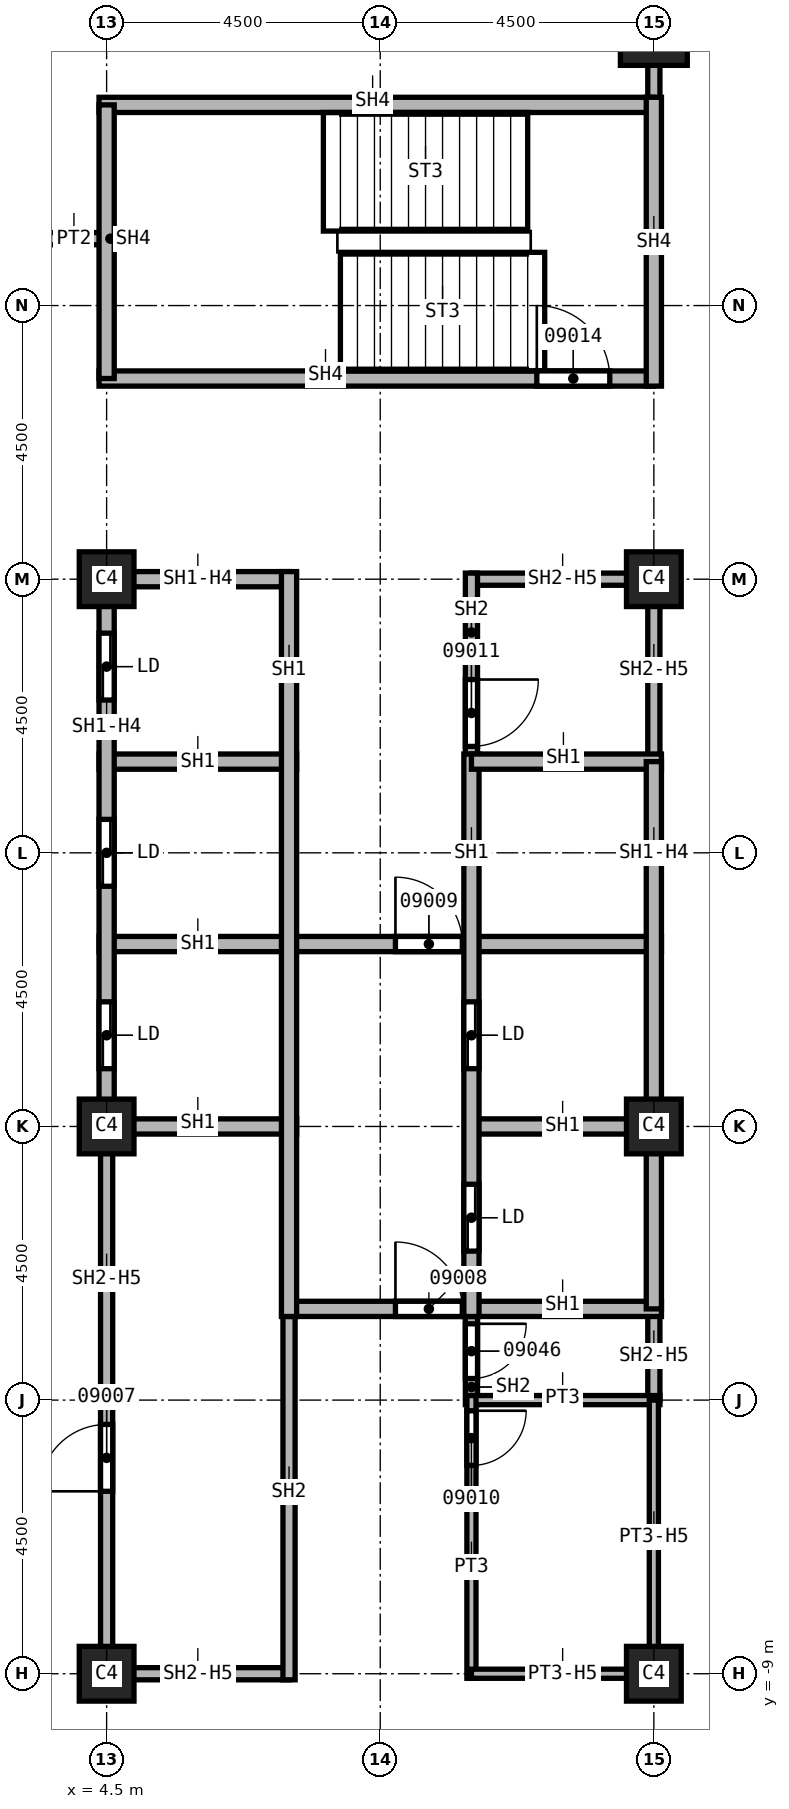
"""IFC4 building model, lengths in metres.
Left out: names, types, materials, properties, quantities, classifications, styles, units other than length and angle.
Written with IfcOpenShell. Run it as: python <this file> out.ifc"""

import sys

from ifc_helpers import new_model, si_unit, direction, frame, frame_2d, origin, origin_2d, place, context, subcontext, project, spatial, rectangle, extrude, element, fill, save


model = new_model("IFC4")
c1 = context("Model", 3, precision=1e-05, world=origin(), true_north=direction((0.0, 1.0)))
c2 = subcontext(c1, "Body", "Model", "MODEL_VIEW")
j1 = project(units=[si_unit("LENGTHUNIT", "METRE"), si_unit("PLANEANGLEUNIT", "RADIAN")], contexts=[c1])
p1 = place(None, origin())
s1 = spatial("IfcSite", under=j1, at=p1, CompositionType="ELEMENT")
p2 = place(p1, origin())
s2 = spatial("IfcBuilding", under=s1, at=p2, CompositionType="ELEMENT")
p3 = place(p2, frame((0.0, 0.0, 162.0)))
s3 = spatial("IfcBuildingStorey", under=s2, at=p3, CompositionType="ELEMENT", Elevation=162.0)
p4 = place(p3, frame((13.5, 18.0, 0.0), z_axis=(0.0, 0.0, 1.0), x_axis=(1.0, 0.0, 0.0)))
e1 = element("IfcColumn", 1, at=p4, inside=s3, PredefinedType="COLUMN", context=c2, shape_type="SweptSolid", body=[
    extrude(rectangle(XDim=1.1, YDim=1.1, at=origin_2d()), origin(), (0.0, 0.0, 1.0), 3.7),
])
for number, where, z_axis, x_axis in (
    (2, (4.5, 0.0, 0.0), (0.0, 0.0, 1.0), (1.0, 0.0, 0.0)),
    (3, (4.5, 9.0, 0.0), (0.0, 0.0, 1.0), (1.0, 0.0, 0.0)),
    (4, (4.5, -9.0, 0.0), (0.0, 0.0, 1.0), (1.0, 0.0, 0.0)),
    (5, (13.5, 0.0, 0.0), (0.0, 0.0, 1.0), (1.0, 0.0, 0.0)),
    (6, (13.5, 9.0, 0.0), (0.0, 0.0, 1.0), (1.0, 0.0, 0.0)),
    (7, (13.5, -9.0, 0.0), (0.0, 0.0, 1.0), (1.0, 0.0, 0.0)),
):
    element("IfcColumn", number, at=place(p3, frame(where, z_axis=z_axis, x_axis=x_axis)), inside=s3, PredefinedType="COLUMN", context=c2, shape_type="SweptSolid", body=[
        extrude(rectangle(XDim=0.9, YDim=0.9, at=origin_2d()), origin(), (0.0, 0.0, 1.0), 3.7),
    ])
p5 = place(p3, frame((3.55, 14.6, 0.0), z_axis=(0.0, 0.0, 1.0), x_axis=(1.0, 0.0, 0.0)))
e8 = element("IfcWall", 8, at=p5, inside=s3, PredefinedType="PARTITIONING", context=c2, shape_type="SweptSolid", body=[
    extrude(rectangle(XDim=0.95, YDim=0.2, at=frame_2d((0.475, 0.0))), origin(), (0.0, 0.0, 1.0), 3.7),
])
p6 = place(p3, frame((13.5, 16.675, 0.0), z_axis=(0.0, 0.0, 1.0), x_axis=(0.0, 1.0, 0.0)))
e9 = element("IfcWall", 9, at=p6, inside=s3, PredefinedType="PARTITIONING", context=c2, shape_type="SweptSolid", body=[
    extrude(rectangle(XDim=6.375, YDim=0.2, at=frame_2d((3.188, 0.0))), origin(), (0.0, 0.0, 1.0), 3.7),
])
p7 = place(p6, frame((4.45, 0.0, 0.0)))
e10 = element("IfcOpeningElement", 10, at=p7, cuts=e9, PredefinedType="OPENING", context=c2, shape_type="SweptSolid", body=[
    extrude(rectangle(XDim=1.0, YDim=2.1, at=frame_2d((0.5, 1.05))), frame((0.0, 0.1, 0.0), z_axis=(0.0, -1.0, 0.0), x_axis=(1.0, 0.0, 0.0)), (0.0, 0.0, 1.0), 0.2),
])
p8 = place(p3, frame((4.5, -9.1, 0.0), z_axis=(0.0, 0.0, 1.0), x_axis=(0.0, 1.0, 0.0)))
e11 = element("IfcWall", 11, at=p8, inside=s3, PredefinedType="SOLIDWALL", context=c2, shape_type="SweptSolid", body=[
    extrude(rectangle(XDim=9.1, YDim=0.2, at=frame_2d((4.55, 0.0))), origin(), (0.0, 0.0, 1.0), 2.938),
])
p9 = place(p8, frame((3.1, 0.0, 0.0)))
e12 = element("IfcOpeningElement", 12, at=p9, cuts=e11, PredefinedType="OPENING", context=c2, shape_type="SweptSolid", body=[
    extrude(rectangle(XDim=1.1, YDim=2.1, at=frame_2d((0.55, 1.05))), frame((0.0, 0.1, 0.0), z_axis=(0.0, -1.0, 0.0), x_axis=(1.0, 0.0, 0.0)), (0.0, 0.0, 1.0), 0.2),
])
p10 = place(p3, frame((7.5, -9.0, 0.0), z_axis=(0.0, 0.0, 1.0), x_axis=(-1.0, 0.0, 0.0)))
e13 = element("IfcWall", 13, at=p10, inside=s3, PredefinedType="SOLIDWALL", context=c2, shape_type="SweptSolid", body=[
    extrude(rectangle(XDim=3.0, YDim=0.2, at=frame_2d((1.5, 0.0))), origin(), (0.0, 0.0, 1.0), 2.938),
])
p11 = place(p3, frame((7.5, -2.875, 0.0), z_axis=(0.0, 0.0, 1.0), x_axis=(0.0, -1.0, 0.0)))
e14 = element("IfcWall", 14, at=p11, inside=s3, PredefinedType="SOLIDWALL", context=c2, shape_type="SweptSolid", body=[
    extrude(rectangle(XDim=6.225, YDim=0.2, at=frame_2d((3.113, 0.0))), origin(), (0.0, 0.0, 1.0), 3.7),
])
p12 = place(p3, frame((10.5, -2.875, 0.0), z_axis=(0.0, 0.0, 1.0), x_axis=(0.0, -1.0, 0.0)))
e15 = element("IfcWall", 15, at=p12, inside=s3, PredefinedType="SOLIDWALL", context=c2, shape_type="SweptSolid", body=[
    extrude(rectangle(XDim=1.7, YDim=0.2, at=frame_2d((0.85, 0.0))), origin(), (0.0, 0.0, 1.0), 3.7),
])
p13 = place(p12, frame((0.37, 0.0, 0.0)))
e16 = element("IfcOpeningElement", 16, at=p13, cuts=e15, PredefinedType="OPENING", context=c2, shape_type="SweptSolid", body=[
    extrude(rectangle(XDim=0.9, YDim=2.1, at=frame_2d((0.45, 1.05))), frame((0.0, 0.1, 0.0), z_axis=(0.0, -1.0, 0.0), x_axis=(1.0, 0.0, 0.0)), (0.0, 0.0, 1.0), 0.2),
])
p14 = place(p3, frame((10.5, 9.0, 0.0), z_axis=(0.0, 0.0, 1.0), x_axis=(1.0, 0.0, 0.0)))
e17 = element("IfcWall", 17, at=p14, inside=s3, PredefinedType="SOLIDWALL", context=c2, shape_type="SweptSolid", body=[
    extrude(rectangle(XDim=3.0, YDim=0.2, at=frame_2d((1.5, 0.0))), origin(), (0.0, 0.0, 1.0), 2.938),
])
p15 = place(p3, frame((10.5, 9.1, 0.0), z_axis=(0.0, 0.0, 1.0), x_axis=(0.0, -1.0, 0.0)))
e18 = element("IfcWall", 18, at=p15, inside=s3, PredefinedType="SOLIDWALL", context=c2, shape_type="SweptSolid", body=[
    extrude(rectangle(XDim=3.225, YDim=0.2, at=frame_2d((1.613, 0.0))), origin(), (0.0, 0.0, 1.0), 3.7),
])
p16 = place(p15, frame((1.75, 0.0, 0.0)))
e19 = element("IfcOpeningElement", 19, at=p16, cuts=e18, PredefinedType="OPENING", context=c2, shape_type="SweptSolid", body=[
    extrude(rectangle(XDim=1.1, YDim=2.1, at=frame_2d((0.55, 1.05))), frame((0.0, 0.1, 0.0), z_axis=(0.0, -1.0, 0.0), x_axis=(1.0, 0.0, 0.0)), (0.0, 0.0, 1.0), 0.2),
])
p17 = place(p3, frame((13.5, -3.0, 0.0), z_axis=(0.0, 0.0, 1.0), x_axis=(0.0, -1.0, 0.0)))
e20 = element("IfcWall", 20, at=p17, inside=s3, PredefinedType="SOLIDWALL", context=c2, shape_type="SweptSolid", body=[
    extrude(rectangle(XDim=1.5, YDim=0.2, at=frame_2d((0.75, 0.0))), origin(), (0.0, 0.0, 1.0), 2.938),
])
p18 = place(p3, frame((13.5, 9.1, 0.0), z_axis=(0.0, 0.0, 1.0), x_axis=(0.0, -1.0, 0.0)))
e21 = element("IfcWall", 21, at=p18, inside=s3, PredefinedType="SOLIDWALL", context=c2, shape_type="SweptSolid", body=[
    extrude(rectangle(XDim=3.1, YDim=0.2, at=frame_2d((1.55, 0.0))), origin(), (0.0, 0.0, 1.0), 2.938),
])
p19 = place(p3, frame((4.375, 0.0, 0.0), z_axis=(0.0, 0.0, 1.0), x_axis=(1.0, 0.0, 0.0)))
e22 = element("IfcWall", 22, at=p19, inside=s3, PredefinedType="SOLIDWALL", context=c2, shape_type="SweptSolid", body=[
    extrude(rectangle(XDim=3.25, YDim=0.25, at=frame_2d((1.625, 0.0))), origin(), (0.0, 0.0, 1.0), 3.7),
])
p20 = place(p3, frame((4.375, 3.0, 0.0), z_axis=(0.0, 0.0, 1.0), x_axis=(1.0, 0.0, 0.0)))
e23 = element("IfcWall", 23, at=p20, inside=s3, PredefinedType="SOLIDWALL", context=c2, shape_type="SweptSolid", body=[
    extrude(rectangle(XDim=9.25, YDim=0.25, at=frame_2d((4.625, 0.0))), origin(), (0.0, 0.0, 1.0), 3.7),
])
p21 = place(p20, frame((4.875, 0.0, 0.0)))
e24 = element("IfcOpeningElement", 24, at=p21, cuts=e23, PredefinedType="OPENING", context=c2, shape_type="SweptSolid", body=[
    extrude(rectangle(XDim=1.1, YDim=2.1, at=frame_2d((0.55, 1.05))), frame((0.0, 0.125, 0.0), z_axis=(0.0, -1.0, 0.0), x_axis=(1.0, 0.0, 0.0)), (0.0, 0.0, 1.0), 0.25),
])
p22 = place(p3, frame((4.375, 6.0, 0.0), z_axis=(0.0, 0.0, 1.0), x_axis=(1.0, 0.0, 0.0)))
e25 = element("IfcWall", 25, at=p22, inside=s3, PredefinedType="SOLIDWALL", context=c2, shape_type="SweptSolid", body=[
    extrude(rectangle(XDim=3.25, YDim=0.25, at=frame_2d((1.625, 0.0))), origin(), (0.0, 0.0, 1.0), 3.7),
])
p23 = place(p3, frame((4.5, 0.0, 0.0), z_axis=(0.0, 0.0, 1.0), x_axis=(0.0, 1.0, 0.0)))
e26 = element("IfcWall", 26, at=p23, inside=s3, PredefinedType="SOLIDWALL", context=c2, shape_type="SweptSolid", body=[
    extrude(rectangle(XDim=9.125, YDim=0.25, at=frame_2d((4.562, 0.0))), origin(), (0.0, 0.0, 1.0), 2.938),
])
p24 = place(p23, frame((0.95, 0.0, 0.0)))
e27 = element("IfcOpeningElement", 27, at=p24, cuts=e26, PredefinedType="OPENING", context=c2, shape_type="SweptSolid", body=[
    extrude(rectangle(XDim=1.1, YDim=2.1, at=frame_2d((0.55, 1.05))), frame((0.0, 0.125, 0.0), z_axis=(0.0, -1.0, 0.0), x_axis=(1.0, 0.0, 0.0)), (0.0, 0.0, 1.0), 0.25),
])
p25 = place(p23, frame((3.95, 0.0, 0.0)))
e28 = element("IfcOpeningElement", 28, at=p25, cuts=e26, PredefinedType="OPENING", context=c2, shape_type="SweptSolid", body=[
    extrude(rectangle(XDim=1.1, YDim=2.1, at=frame_2d((0.55, 1.05))), frame((0.0, 0.125, 0.0), z_axis=(0.0, -1.0, 0.0), x_axis=(1.0, 0.0, 0.0)), (0.0, 0.0, 1.0), 0.25),
])
p26 = place(p23, frame((7.012, 0.0, 0.0)))
e29 = element("IfcOpeningElement", 29, at=p26, cuts=e26, PredefinedType="OPENING", context=c2, shape_type="SweptSolid", body=[
    extrude(rectangle(XDim=1.1, YDim=2.1, at=frame_2d((0.55, 1.05))), frame((0.0, 0.125, 0.0), z_axis=(0.0, -1.0, 0.0), x_axis=(1.0, 0.0, 0.0)), (0.0, 0.0, 1.0), 0.25),
])
p27 = place(p3, frame((4.5, 9.0, 0.0), z_axis=(0.0, 0.0, 1.0), x_axis=(1.0, 0.0, 0.0)))
e30 = element("IfcWall", 30, at=p27, inside=s3, PredefinedType="SOLIDWALL", context=c2, shape_type="SweptSolid", body=[
    extrude(rectangle(XDim=3.0, YDim=0.25, at=frame_2d((1.5, 0.0))), origin(), (0.0, 0.0, 1.0), 2.938),
])
p28 = place(p3, frame((7.5, -3.0, 0.0), z_axis=(0.0, 0.0, 1.0), x_axis=(1.0, 0.0, 0.0)))
e31 = element("IfcWall", 31, at=p28, inside=s3, PredefinedType="SOLIDWALL", context=c2, shape_type="SweptSolid", body=[
    extrude(rectangle(XDim=6.125, YDim=0.25, at=frame_2d((3.062, 0.0))), origin(), (0.0, 0.0, 1.0), 3.7),
])
p29 = place(p28, frame((1.75, 0.0, 0.0)))
e32 = element("IfcOpeningElement", 32, at=p29, cuts=e31, PredefinedType="OPENING", context=c2, shape_type="SweptSolid", body=[
    extrude(rectangle(XDim=1.1, YDim=2.1, at=frame_2d((0.55, 1.05))), frame((0.0, 0.125, 0.0), z_axis=(0.0, -1.0, 0.0), x_axis=(1.0, 0.0, 0.0)), (0.0, 0.0, 1.0), 0.25),
])
p30 = place(p3, frame((7.5, 9.125, 0.0), z_axis=(0.0, 0.0, 1.0), x_axis=(0.0, -1.0, 0.0)))
e33 = element("IfcWall", 33, at=p30, inside=s3, PredefinedType="SOLIDWALL", context=c2, shape_type="SweptSolid", body=[
    extrude(rectangle(XDim=12.25, YDim=0.25, at=frame_2d((6.125, 0.0))), origin(), (0.0, 0.0, 1.0), 3.7),
])
p31 = place(p3, frame((10.5, 0.0, 0.0), z_axis=(0.0, 0.0, 1.0), x_axis=(1.0, 0.0, 0.0)))
e34 = element("IfcWall", 34, at=p31, inside=s3, PredefinedType="SOLIDWALL", context=c2, shape_type="SweptSolid", body=[
    extrude(rectangle(XDim=3.125, YDim=0.25, at=frame_2d((1.562, 0.0))), origin(), (0.0, 0.0, 1.0), 3.7),
])
p32 = place(p3, frame((10.5, 6.125, 0.0), z_axis=(0.0, 0.0, 1.0), x_axis=(0.0, -1.0, 0.0)))
e35 = element("IfcWall", 35, at=p32, inside=s3, PredefinedType="SOLIDWALL", context=c2, shape_type="SweptSolid", body=[
    extrude(rectangle(XDim=9.25, YDim=0.25, at=frame_2d((4.625, 0.0))), origin(), (0.0, 0.0, 1.0), 3.7),
])
p33 = place(p32, frame((7.075, 0.0, 0.0)))
e36 = element("IfcOpeningElement", 36, at=p33, cuts=e35, PredefinedType="OPENING", context=c2, shape_type="SweptSolid", body=[
    extrude(rectangle(XDim=1.1, YDim=2.1, at=frame_2d((0.55, 1.05))), frame((0.0, 0.125, 0.0), z_axis=(0.0, -1.0, 0.0), x_axis=(1.0, 0.0, 0.0)), (0.0, 0.0, 1.0), 0.25),
])
p34 = place(p32, frame((4.075, 0.0, 0.0)))
e37 = element("IfcOpeningElement", 37, at=p34, cuts=e35, PredefinedType="OPENING", context=c2, shape_type="SweptSolid", body=[
    extrude(rectangle(XDim=1.1, YDim=2.1, at=frame_2d((0.55, 1.05))), frame((0.0, 0.125, 0.0), z_axis=(0.0, -1.0, 0.0), x_axis=(1.0, 0.0, 0.0)), (0.0, 0.0, 1.0), 0.25),
])
p35 = place(p3, frame((10.5, 6.0, 0.0), z_axis=(0.0, 0.0, 1.0), x_axis=(1.0, 0.0, 0.0)))
e38 = element("IfcWall", 38, at=p35, inside=s3, PredefinedType="SOLIDWALL", context=c2, shape_type="SweptSolid", body=[
    extrude(rectangle(XDim=3.125, YDim=0.25, at=frame_2d((1.562, 0.0))), origin(), (0.0, 0.0, 1.0), 3.7),
])
p36 = place(p3, frame((13.5, 6.0, 0.0), z_axis=(0.0, 0.0, 1.0), x_axis=(0.0, -1.0, 0.0)))
e39 = element("IfcWall", 39, at=p36, inside=s3, PredefinedType="SOLIDWALL", context=c2, shape_type="SweptSolid", body=[
    extrude(rectangle(XDim=9.0, YDim=0.25, at=frame_2d((4.5, 0.0))), origin(), (0.0, 0.0, 1.0), 2.938),
])
p37 = place(p3, frame((4.375, 12.3, 0.0), z_axis=(0.0, 0.0, 1.0), x_axis=(1.0, 0.0, 0.0)))
e40 = element("IfcWall", 40, at=p37, inside=s3, PredefinedType="SOLIDWALL", context=c2, shape_type="SweptSolid", body=[
    extrude(rectangle(XDim=9.125, YDim=0.25, at=frame_2d((4.562, 0.0))), origin(), (0.0, 0.0, 1.0), 3.7),
])
p38 = place(p37, frame((7.2, 0.0, 0.0)))
e41 = element("IfcOpeningElement", 41, at=p38, cuts=e40, PredefinedType="OPENING", context=c2, shape_type="SweptSolid", body=[
    extrude(rectangle(XDim=1.2, YDim=2.1, at=frame_2d((0.6, 1.05))), frame((0.0, 0.125, 0.0), z_axis=(0.0, -1.0, 0.0), x_axis=(1.0, 0.0, 0.0)), (0.0, 0.0, 1.0), 0.25),
])
p39 = place(p3, frame((4.375, 16.8, 0.0), z_axis=(0.0, 0.0, 1.0), x_axis=(1.0, 0.0, 0.0)))
e42 = element("IfcWall", 42, at=p39, inside=s3, PredefinedType="SOLIDWALL", context=c2, shape_type="SweptSolid", body=[
    extrude(rectangle(XDim=9.125, YDim=0.25, at=frame_2d((4.562, 0.0))), origin(), (0.0, 0.0, 1.0), 3.7),
])
p40 = place(p3, frame((4.5, 12.3, 0.0), z_axis=(0.0, 0.0, 1.0), x_axis=(0.0, 1.0, 0.0)))
e43 = element("IfcWall", 43, at=p40, inside=s3, PredefinedType="SOLIDWALL", context=c2, shape_type="SweptSolid", body=[
    extrude(rectangle(XDim=4.5, YDim=0.25, at=frame_2d((2.25, 0.0))), origin(), (0.0, 0.0, 1.0), 3.7),
])
p41 = place(p3, frame((13.5, 12.175, 0.0), z_axis=(0.0, 0.0, 1.0), x_axis=(0.0, 1.0, 0.0)))
e44 = element("IfcWall", 44, at=p41, inside=s3, PredefinedType="SOLIDWALL", context=c2, shape_type="SweptSolid", body=[
    extrude(rectangle(XDim=4.75, YDim=0.25, at=frame_2d((2.375, 0.0))), origin(), (0.0, 0.0, 1.0), 3.7),
])
p42 = place(p3, frame((10.5, -4.5, 0.0), z_axis=(0.0, 0.0, 1.0), x_axis=(1.0, 0.0, 0.0)))
e45 = element("IfcWall", 45, at=p42, inside=s3, PredefinedType="PARTITIONING", context=c2, shape_type="SweptSolid", body=[
    extrude(rectangle(XDim=3.1, YDim=0.15, at=frame_2d((1.55, 0.0))), origin(), (0.0, 0.0, 1.0), 3.7),
])
p43 = place(p3, frame((10.5, -4.425, 0.0), z_axis=(0.0, 0.0, 1.0), x_axis=(0.0, -1.0, 0.0)))
e46 = element("IfcWall", 46, at=p43, inside=s3, PredefinedType="PARTITIONING", context=c2, shape_type="SweptSolid", body=[
    extrude(rectangle(XDim=4.65, YDim=0.15, at=frame_2d((2.325, 0.0))), origin(), (0.0, 0.0, 1.0), 3.7),
])
p44 = place(p43, frame((0.25, 0.0, 0.0)))
e47 = element("IfcOpeningElement", 47, at=p44, cuts=e46, PredefinedType="OPENING", context=c2, shape_type="SweptSolid", body=[
    extrude(rectangle(XDim=0.9, YDim=2.1, at=frame_2d((0.45, 1.05))), frame((0.0, 0.075, 0.0), z_axis=(0.0, -1.0, 0.0), x_axis=(1.0, 0.0, 0.0)), (0.0, 0.0, 1.0), 0.15),
])
p45 = place(p3, frame((13.5, -9.0, 0.0), z_axis=(0.0, 0.0, 1.0), x_axis=(-1.0, 0.0, 0.0)))
e48 = element("IfcWall", 48, at=p45, inside=s3, PredefinedType="PARTITIONING", context=c2, shape_type="SweptSolid", body=[
    extrude(rectangle(XDim=3.0, YDim=0.15, at=frame_2d((1.5, 0.0))), origin(), (0.0, 0.0, 1.0), 2.938),
])
p46 = place(p3, frame((13.5, -4.5, 0.0), z_axis=(0.0, 0.0, 1.0), x_axis=(0.0, -1.0, 0.0)))
e49 = element("IfcWall", 49, at=p46, inside=s3, PredefinedType="PARTITIONING", context=c2, shape_type="SweptSolid", body=[
    extrude(rectangle(XDim=4.575, YDim=0.15, at=frame_2d((2.288, 0.0))), origin(), (0.0, 0.0, 1.0), 2.938),
])
p47 = place(p9, origin())
e50 = element("IfcDoor", 50, at=p47, inside=s3, OperationType="SINGLE_SWING_RIGHT", PredefinedType="DOOR", context=c2, shape_type="SweptSolid", body=[
    extrude(rectangle(XDim=1.1, YDim=2.1, at=frame_2d((0.55, 1.05))), frame((0.0, 0.025, 0.0), z_axis=(0.0, -1.0, 0.0), x_axis=(1.0, 0.0, 0.0)), (0.0, 0.0, 1.0), 0.05),
])
fill(e12, e50)
p48 = place(p29, origin())
e51 = element("IfcDoor", 51, at=p48, inside=s3, OperationType="SINGLE_SWING_LEFT", PredefinedType="DOOR", context=c2, shape_type="SweptSolid", body=[
    extrude(rectangle(XDim=1.1, YDim=2.1, at=frame_2d((0.55, 1.05))), frame((0.0, 0.025, 0.0), z_axis=(0.0, -1.0, 0.0), x_axis=(1.0, 0.0, 0.0)), (0.0, 0.0, 1.0), 0.05),
])
fill(e32, e51)
p49 = place(p21, origin())
e52 = element("IfcDoor", 52, at=p49, inside=s3, OperationType="SINGLE_SWING_RIGHT", PredefinedType="DOOR", context=c2, shape_type="SweptSolid", body=[
    extrude(rectangle(XDim=1.1, YDim=2.1, at=frame_2d((0.55, 1.05))), frame((0.0, 0.025, 0.0), z_axis=(0.0, -1.0, 0.0), x_axis=(1.0, 0.0, 0.0)), (0.0, 0.0, 1.0), 0.05),
])
fill(e24, e52)
p50 = place(p44, origin())
e53 = element("IfcDoor", 53, at=p50, inside=s3, OperationType="SINGLE_SWING_LEFT", PredefinedType="DOOR", context=c2, shape_type="SweptSolid", body=[
    extrude(rectangle(XDim=0.9, YDim=2.1, at=frame_2d((0.45, 1.05))), frame((0.0, 0.025, 0.0), z_axis=(0.0, -1.0, 0.0), x_axis=(1.0, 0.0, 0.0)), (0.0, 0.0, 1.0), 0.05),
])
fill(e47, e53)
p51 = place(p16, origin())
e54 = element("IfcDoor", 54, at=p51, inside=s3, OperationType="SINGLE_SWING_RIGHT", PredefinedType="DOOR", context=c2, shape_type="SweptSolid", body=[
    extrude(rectangle(XDim=1.1, YDim=2.1, at=frame_2d((0.55, 1.05))), frame((0.0, 0.025, 0.0), z_axis=(0.0, -1.0, 0.0), x_axis=(1.0, 0.0, 0.0)), (0.0, 0.0, 1.0), 0.05),
])
fill(e19, e54)
p52 = place(p38, origin())
e55 = element("IfcDoor", 55, at=p52, inside=s3, OperationType="SINGLE_SWING_LEFT", PredefinedType="DOOR", context=c2, shape_type="SweptSolid", body=[
    extrude(rectangle(XDim=1.2, YDim=2.1, at=frame_2d((0.6, 1.05))), frame((0.0, 0.025, 0.0), z_axis=(0.0, -1.0, 0.0), x_axis=(1.0, 0.0, 0.0)), (0.0, 0.0, 1.0), 0.05),
])
fill(e41, e55)
p53 = place(p13, origin())
e56 = element("IfcDoor", 56, at=p53, inside=s3, OperationType="SINGLE_SWING_LEFT", PredefinedType="DOOR", context=c2, shape_type="SweptSolid", body=[
    extrude(rectangle(XDim=0.9, YDim=2.1, at=frame_2d((0.45, 1.05))), frame((0.0, 0.025, 0.0), z_axis=(0.0, -1.0, 0.0), x_axis=(1.0, 0.0, 0.0)), (0.0, 0.0, 1.0), 0.05),
])
fill(e16, e56)
p54 = place(p24, origin())
e57 = element("IfcDoor", 57, at=p54, inside=s3, OperationType="SLIDING_TO_LEFT", PredefinedType="DOOR", context=c2, shape_type="SweptSolid", body=[
    extrude(rectangle(XDim=1.1, YDim=2.1, at=frame_2d((0.55, 1.05))), frame((0.0, 0.025, 0.0), z_axis=(0.0, -1.0, 0.0), x_axis=(1.0, 0.0, 0.0)), (0.0, 0.0, 1.0), 0.05),
])
fill(e27, e57)
p55 = place(p25, origin())
e58 = element("IfcDoor", 58, at=p55, inside=s3, OperationType="SLIDING_TO_LEFT", PredefinedType="DOOR", context=c2, shape_type="SweptSolid", body=[
    extrude(rectangle(XDim=1.1, YDim=2.1, at=frame_2d((0.55, 1.05))), frame((0.0, 0.025, 0.0), z_axis=(0.0, -1.0, 0.0), x_axis=(1.0, 0.0, 0.0)), (0.0, 0.0, 1.0), 0.05),
])
fill(e28, e58)
p56 = place(p26, origin())
e59 = element("IfcDoor", 59, at=p56, inside=s3, OperationType="SLIDING_TO_LEFT", PredefinedType="DOOR", context=c2, shape_type="SweptSolid", body=[
    extrude(rectangle(XDim=1.1, YDim=2.1, at=frame_2d((0.55, 1.05))), frame((0.0, 0.025, 0.0), z_axis=(0.0, -1.0, 0.0), x_axis=(1.0, 0.0, 0.0)), (0.0, 0.0, 1.0), 0.05),
])
fill(e29, e59)
p57 = place(p33, origin())
e60 = element("IfcDoor", 60, at=p57, inside=s3, OperationType="SLIDING_TO_LEFT", PredefinedType="DOOR", context=c2, shape_type="SweptSolid", body=[
    extrude(rectangle(XDim=1.1, YDim=2.1, at=frame_2d((0.55, 1.05))), frame((0.0, 0.025, 0.0), z_axis=(0.0, -1.0, 0.0), x_axis=(1.0, 0.0, 0.0)), (0.0, 0.0, 1.0), 0.05),
])
fill(e36, e60)
p58 = place(p34, origin())
e61 = element("IfcDoor", 61, at=p58, inside=s3, OperationType="SLIDING_TO_LEFT", PredefinedType="DOOR", context=c2, shape_type="SweptSolid", body=[
    extrude(rectangle(XDim=1.1, YDim=2.1, at=frame_2d((0.55, 1.05))), frame((0.0, 0.025, 0.0), z_axis=(0.0, -1.0, 0.0), x_axis=(1.0, 0.0, 0.0)), (0.0, 0.0, 1.0), 0.05),
])
fill(e37, e61)
save(model, sys.argv[1])
